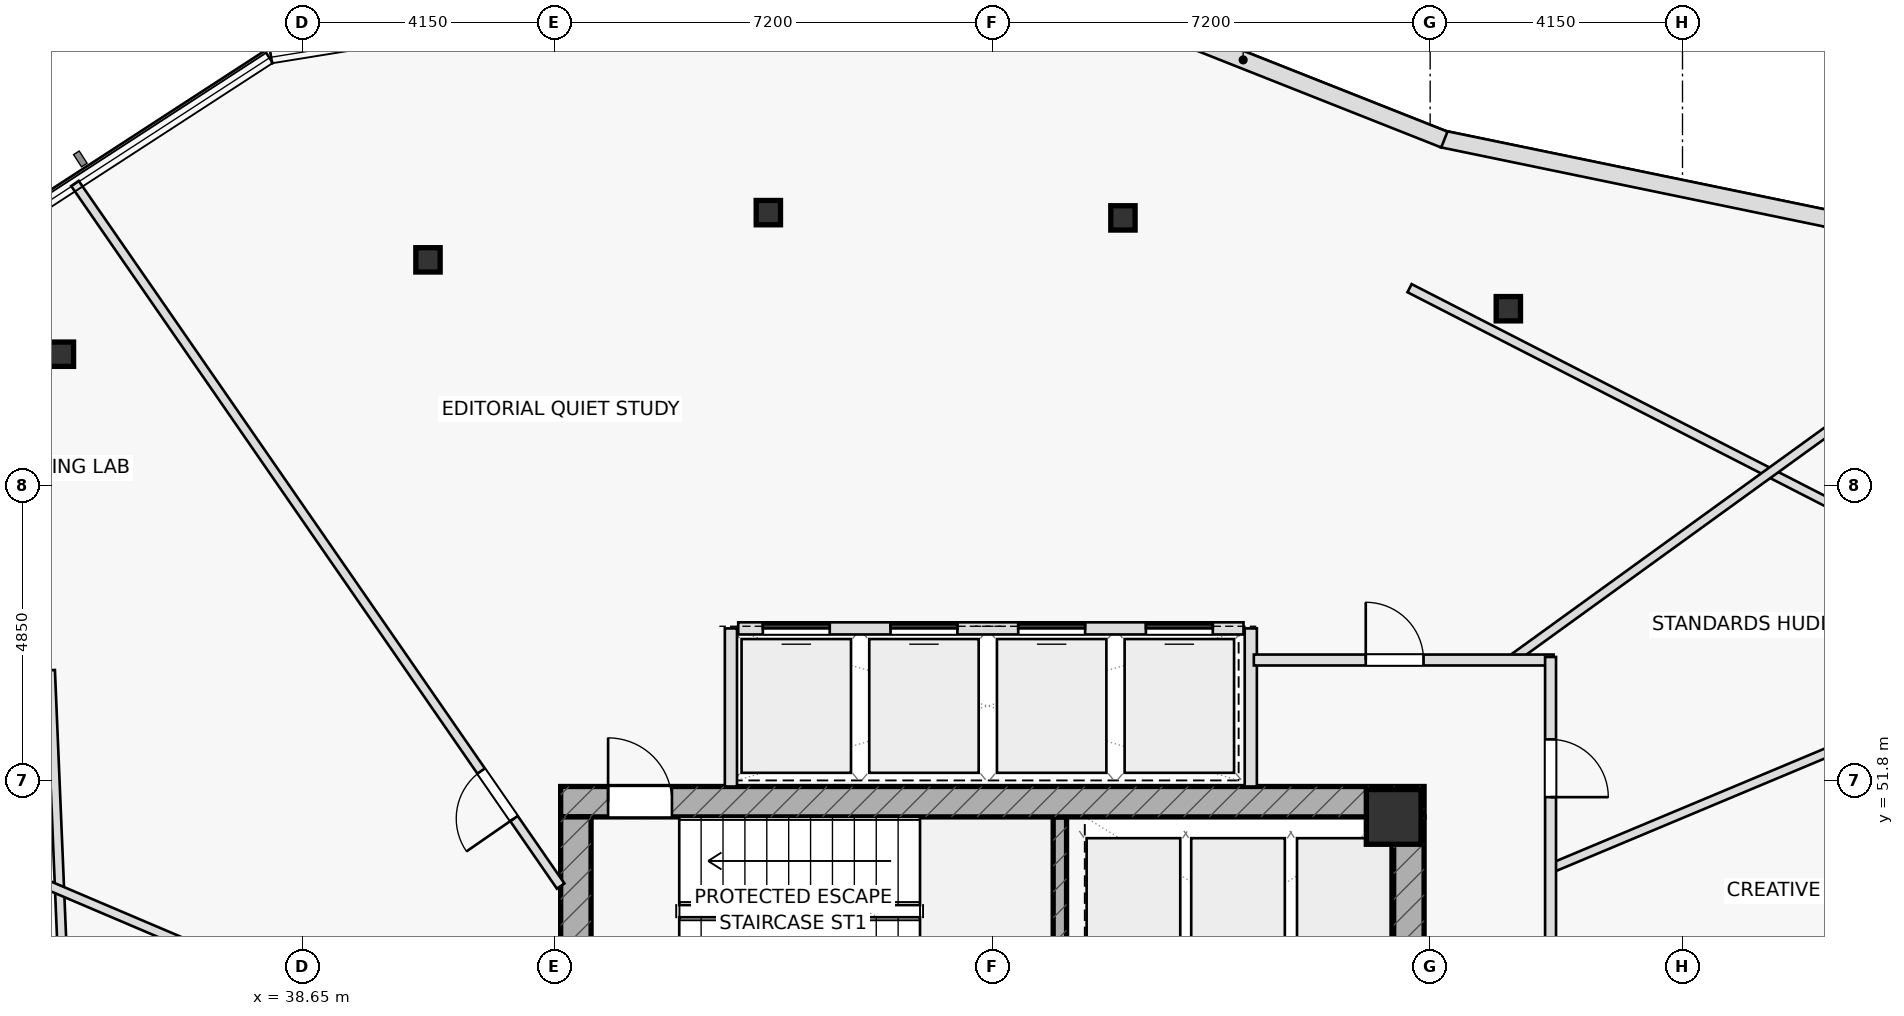
"""IFC4 building model, lengths in metres.
Left out: names, types, materials, properties, quantities, classifications, styles, units other than length and angle.
Written with IfcOpenShell. Run it as: python <this file> out.ifc"""

import sys

from ifc_helpers import new_model, si_unit, direction, frame, frame_2d, origin, origin_2d, place, context, subcontext, project, spatial, rectangle, hollow_rectangle, extrude, element, fill, save


model = new_model("IFC4")
c1 = context("Model", 3, precision=1e-05, world=origin(), true_north=direction((0.0, 1.0)))
c2 = subcontext(c1, "Body", "Model", "MODEL_VIEW")
j1 = project(units=[si_unit("LENGTHUNIT", "METRE"), si_unit("PLANEANGLEUNIT", "RADIAN")], contexts=[c1])
p1 = place(None, origin())
s1 = spatial("IfcSite", under=j1, at=p1, CompositionType="ELEMENT")
p2 = place(p1, origin())
s2 = spatial("IfcBuilding", under=s1, at=p2, CompositionType="ELEMENT")
p3 = place(p2, frame((0.0, 0.0, 321.5)))
s3 = spatial("IfcBuildingStorey", under=s2, at=p3, CompositionType="ELEMENT", Elevation=321.5)
p4 = place(p3, frame((51.11, 48.1, 0.0), z_axis=(0.0, 0.0, 1.0), x_axis=(0.0, 1.0, 0.0)))
e1 = element("IfcWall", 1, at=p4, inside=s3, PredefinedType="SHEAR", context=c2, shape_type="SweptSolid", body=[
    extrude(rectangle(XDim=3.1, YDim=0.22, at=frame_2d((1.55, 0.0))), origin(), (0.0, 0.0, 1.0), 3.55),
])
p5 = place(p3, frame((42.9, 51.45, 0.0), z_axis=(0.0, 0.0, 1.0), x_axis=(1.0, 0.0, 0.0)))
e2 = element("IfcWall", 2, at=p5, inside=s3, PredefinedType="SHEAR", context=c2, shape_type="SweptSolid", body=[
    extrude(rectangle(XDim=14.2, YDim=0.5, at=frame_2d((7.1, 0.0))), origin(), (0.0, 0.0, 1.0), 3.55),
])
p6 = place(p5, frame((0.78, 0.0, 0.0)))
e3 = element("IfcOpeningElement", 3, at=p6, cuts=e2, PredefinedType="OPENING", context=c2, shape_type="SweptSolid", body=[
    extrude(rectangle(XDim=1.05, YDim=2.2, at=frame_2d((0.525, 1.1))), frame((0.0, 0.26, 0.0), z_axis=(0.0, -1.0, 0.0), x_axis=(1.0, 0.0, 0.0)), (0.0, 0.0, 1.0), 0.52),
])
p7 = place(p3, frame((43.15, 38.8, 0.0), z_axis=(0.0, 0.0, 1.0), x_axis=(0.0, 1.0, 0.0)))
e4 = element("IfcWall", 4, at=p7, inside=s3, PredefinedType="SHEAR", context=c2, shape_type="SweptSolid", body=[
    extrude(rectangle(XDim=12.4, YDim=0.5, at=frame_2d((6.2, 0.0))), origin(), (0.0, 0.0, 1.0), 3.55),
])
p8 = place(p3, frame((56.85, 38.8, 0.0), z_axis=(0.0, 0.0, 1.0), x_axis=(0.0, 1.0, 0.0)))
e5 = element("IfcWall", 5, at=p8, inside=s3, PredefinedType="SHEAR", context=c2, shape_type="SweptSolid", body=[
    extrude(rectangle(XDim=12.4, YDim=0.5, at=frame_2d((6.2, 0.0))), origin(), (0.0, 0.0, 1.0), 3.55),
])
p9 = place(p8, frame((3.85, 0.0, 0.0)))
e6 = element("IfcOpeningElement", 6, at=p9, cuts=e5, PredefinedType="OPENING", context=c2, shape_type="SweptSolid", body=[
    extrude(rectangle(XDim=1.5, YDim=2.2, at=frame_2d((0.75, 1.1))), frame((0.0, 0.26, 0.0), z_axis=(0.0, -1.0, 0.0), x_axis=(1.0, 0.0, 0.0)), (0.0, 0.0, 1.0), 0.52),
])
p10 = place(p3, frame((56.6, 51.2, 0.0), z_axis=(0.0, 0.0, 1.0), x_axis=(1.0, 0.0, 0.0)))
e7 = element("IfcColumn", 7, at=p10, inside=s3, PredefinedType="COLUMN", context=c2, shape_type="SweptSolid", body=[
    extrude(rectangle(XDim=0.9, YDim=0.9, at=origin_2d()), origin(), (0.0, 0.0, 1.0), 3.55),
])
for number, where, z_axis, x_axis in (
    (8, (58.486, 59.557, 0.0), (0.0, 0.0, 1.0), (1.0, 0.0, 0.0)),
    (9, (52.147, 61.051, 0.0), (0.0, 0.0, 1.0), (1.0, 0.0, 0.0)),
    (10, (46.315, 61.137, 0.0), (0.0, 0.0, 1.0), (1.0, 0.0, 0.0)),
    (11, (40.718, 60.361, 0.0), (0.0, 0.0, 1.0), (1.0, 0.0, 0.0)),
    (12, (34.689, 58.809, 0.0), (0.0, 0.0, 1.0), (1.0, 0.0, 0.0)),
):
    element("IfcColumn", number, at=place(p3, frame(where, z_axis=z_axis, x_axis=x_axis)), inside=s3, PredefinedType="COLUMN", context=c2, shape_type="SweptSolid", body=[
        extrude(hollow_rectangle(XDim=0.4, YDim=0.4, WallThickness=0.025, at=origin_2d()), origin(), (0.0, 0.0, 1.0), 3.55),
    ])
for number, where, z_axis, x_axis in (
    (13, (45.7, 51.7, 0.0), (0.0, 0.0, 1.0), (0.0, 1.0, 0.0)),
    (14, (54.25, 51.7, 0.0), (0.0, 0.0, 1.0), (0.0, 1.0, 0.0)),
):
    element("IfcWall", number, at=place(p3, frame(where, z_axis=z_axis, x_axis=x_axis)), inside=s3, PredefinedType="PARTITIONING", context=c2, shape_type="SweptSolid", body=[
        extrude(rectangle(XDim=2.6, YDim=0.2, at=frame_2d((1.3, 0.0))), origin(), (0.0, 0.0, 1.0), 3.55),
    ])
p11 = place(p3, frame((34.507, 53.613, 0.0), z_axis=(0.0, 0.0, 1.0), x_axis=(0.041875090182, -0.999122853718, 0.0)))
e15 = element("IfcWall", 15, at=p11, inside=s3, PredefinedType="PARTITIONING", context=c2, shape_type="SweptSolid", body=[
    extrude(rectangle(XDim=8.139, YDim=0.15, at=frame_2d((4.069, 0.0))), origin(), (0.0, 0.0, 1.0), 3.125),
])
p12 = place(p3, frame((66.543, 54.934, 0.0), z_axis=(0.0, 0.0, 1.0), x_axis=(-0.889966951661, 0.456025026673, 0.0)))
e16 = element("IfcWall", 16, at=p12, inside=s3, PredefinedType="PARTITIONING", context=c2, shape_type="SweptSolid", body=[
    extrude(rectangle(XDim=10.879, YDim=0.15, at=frame_2d((5.439, 0.0))), origin(), (0.0, 0.0, 1.0), 3.125),
])
p13 = place(p3, frame((59.18, 50.354, 0.0), z_axis=(0.0, 0.0, 1.0), x_axis=(0.922338705377, 0.38638233987, 0.0)))
e17 = element("IfcWall", 17, at=p13, inside=s3, PredefinedType="PARTITIONING", context=c2, shape_type="SweptSolid", body=[
    extrude(rectangle(XDim=8.267, YDim=0.15, at=frame_2d((4.134, 0.0))), origin(), (0.0, 0.0, 1.0), 3.125),
])
p14 = place(p3, frame((58.532, 53.78, 0.0), z_axis=(0.0, 0.0, 1.0), x_axis=(0.810096856505, 0.58629607118, 0.0)))
e18 = element("IfcWall", 18, at=p14, inside=s3, PredefinedType="PARTITIONING", context=c2, shape_type="SweptSolid", body=[
    extrude(rectangle(XDim=9.768, YDim=0.15, at=frame_2d((4.884, 0.0))), origin(), (0.0, 0.0, 1.0), 3.125),
])
p15 = place(p3, frame((42.9, 50.062, 0.0), z_axis=(0.0, 0.0, 1.0), x_axis=(-0.568663071572, 0.822570550792, 0.0)))
e19 = element("IfcWall", 19, at=p15, inside=s3, PredefinedType="PARTITIONING", context=c2, shape_type="SweptSolid", body=[
    extrude(rectangle(XDim=14.047, YDim=0.15, at=frame_2d((7.023, 0.0))), origin(), (0.0, 0.0, 1.0), 3.075),
])
p16 = place(p15, frame((1.35, 0.0, 0.0)))
e20 = element("IfcOpeningElement", 20, at=p16, cuts=e19, PredefinedType="OPENING", context=c2, shape_type="SweptSolid", body=[
    extrude(rectangle(XDim=0.95, YDim=2.05, at=frame_2d((0.475, 1.025))), frame((0.0, 0.085, 0.0), z_axis=(0.0, -1.0, 0.0), x_axis=(1.0, 0.0, 0.0)), (0.0, 0.0, 1.0), 0.17),
])
p17 = place(p3, frame((39.49, 47.94, 0.0), z_axis=(0.0, 0.0, 1.0), x_axis=(-0.920160749364, 0.391540796507, 0.0)))
e21 = element("IfcWall", 21, at=p17, inside=s3, PredefinedType="PARTITIONING", context=c2, shape_type="SweptSolid", body=[
    extrude(rectangle(XDim=17.142, YDim=0.15, at=frame_2d((8.571, 0.0))), origin(), (0.0, 0.0, 1.0), 3.075),
])
p18 = place(p3, frame((37.08, 47.575, 0.0), z_axis=(0.0, 0.0, 1.0), x_axis=(-0.963875151347, 0.266354449215, 0.0)))
e22 = element("IfcWall", 22, at=p18, inside=s3, PredefinedType="PARTITIONING", context=c2, shape_type="SweptSolid", body=[
    extrude(rectangle(XDim=13.459, YDim=0.15, at=frame_2d((6.73, 0.0))), origin(), (0.0, 0.0, 1.0), 3.075),
])
p19 = place(p3, frame((54.3, 53.78, 0.0), z_axis=(0.0, 0.0, 1.0), x_axis=(1.0, 0.0, 0.0)))
e23 = element("IfcWall", 23, at=p19, inside=s3, PredefinedType="PARTITIONING", context=c2, shape_type="SweptSolid", body=[
    extrude(rectangle(XDim=4.93, YDim=0.18, at=frame_2d((2.465, 0.0))), origin(), (0.0, 0.0, 1.0), 3.55),
])
p20 = place(p19, frame((1.841, 0.0, 0.0)))
e24 = element("IfcOpeningElement", 24, at=p20, cuts=e23, PredefinedType="OPENING", context=c2, shape_type="SweptSolid", body=[
    extrude(rectangle(XDim=0.95, YDim=2.05, at=frame_2d((0.475, 1.025))), frame((0.0, 0.1, 0.0), z_axis=(0.0, -1.0, 0.0), x_axis=(1.0, 0.0, 0.0)), (0.0, 0.0, 1.0), 0.2),
])
p21 = place(p3, frame((59.18, 53.83, 0.0), z_axis=(0.0, 0.0, 1.0), x_axis=(0.0, -1.0, 0.0)))
e25 = element("IfcWall", 25, at=p21, inside=s3, PredefinedType="PARTITIONING", context=c2, shape_type="SweptSolid", body=[
    extrude(rectangle(XDim=5.53, YDim=0.18, at=frame_2d((2.765, 0.0))), origin(), (0.0, 0.0, 1.0), 3.55),
])
p22 = place(p21, frame((1.355, 0.0, 0.0)))
e26 = element("IfcOpeningElement", 26, at=p22, cuts=e25, PredefinedType="OPENING", context=c2, shape_type="SweptSolid", body=[
    extrude(rectangle(XDim=0.95, YDim=2.05, at=frame_2d((0.475, 1.025))), frame((0.0, 0.1, 0.0), z_axis=(0.0, -1.0, 0.0), x_axis=(1.0, 0.0, 0.0)), (0.0, 0.0, 1.0), 0.2),
])
p23 = place(p3, frame((65.307, 60.532, 0.0), z_axis=(0.0, 0.0, 1.0), x_axis=(-0.951871327544, 0.306497921362, 0.0)))
e27 = element("IfcWall", 27, at=p23, inside=s3, PredefinedType="STANDARD", context=c2, shape_type="SweptSolid", body=[
    extrude(rectangle(XDim=1.681, YDim=0.28, at=frame_2d((0.841, 0.0))), origin(), (0.0, 0.0, 1.0), 3.55),
])
p24 = place(p3, frame((63.735, 61.04, 0.0), z_axis=(0.0, 0.0, 1.0), x_axis=(-0.979302516602, 0.202402028095, 0.0)))
e28 = element("IfcWall", 28, at=p24, inside=s3, PredefinedType="STANDARD", context=c2, shape_type="SweptSolid", body=[
    extrude(rectangle(XDim=6.464, YDim=0.28, at=frame_2d((3.232, 0.0))), origin(), (0.0, 0.0, 1.0), 3.55),
])
p25 = place(p3, frame((57.433, 62.339, 0.0), z_axis=(0.0, 0.0, 1.0), x_axis=(-0.929788514936, 0.368094169327, 0.0)))
e29 = element("IfcWall", 29, at=p25, inside=s3, PredefinedType="STANDARD", context=c2, shape_type="SweptSolid", body=[
    extrude(rectangle(XDim=7.117, YDim=0.28, at=frame_2d((3.559, 0.0))), origin(), (0.0, 0.0, 1.0), 3.55),
])
p26 = place(p3, frame((45.82, 54.3, 0.0), z_axis=(0.0, 0.0, 1.0), x_axis=(1.0, 0.0, 0.0)))
e30 = element("IfcWall", 30, at=p26, inside=s3, PredefinedType="PARTITIONING", context=c2, shape_type="SweptSolid", body=[
    extrude(rectangle(XDim=8.31, YDim=0.2, at=frame_2d((4.155, 0.0))), origin(), (0.0, 0.0, 1.0), 3.55),
])
p27 = place(p26, frame((0.405, 0.0, 0.0)))
e31 = element("IfcOpeningElement", 31, at=p27, cuts=e30, PredefinedType="OPENING", context=c2, shape_type="SweptSolid", body=[
    extrude(rectangle(XDim=1.1, YDim=2.15, at=frame_2d((0.55, 1.075))), frame((0.0, 0.11, 0.0), z_axis=(0.0, -1.0, 0.0), x_axis=(1.0, 0.0, 0.0)), (0.0, 0.0, 1.0), 0.22),
])
p28 = place(p26, frame((2.505, 0.0, 0.0)))
e32 = element("IfcOpeningElement", 32, at=p28, cuts=e30, PredefinedType="OPENING", context=c2, shape_type="SweptSolid", body=[
    extrude(rectangle(XDim=1.1, YDim=2.15, at=frame_2d((0.55, 1.075))), frame((0.0, 0.11, 0.0), z_axis=(0.0, -1.0, 0.0), x_axis=(1.0, 0.0, 0.0)), (0.0, 0.0, 1.0), 0.22),
])
p29 = place(p26, frame((4.605, 0.0, 0.0)))
e33 = element("IfcOpeningElement", 33, at=p29, cuts=e30, PredefinedType="OPENING", context=c2, shape_type="SweptSolid", body=[
    extrude(rectangle(XDim=1.1, YDim=2.15, at=frame_2d((0.55, 1.075))), frame((0.0, 0.11, 0.0), z_axis=(0.0, -1.0, 0.0), x_axis=(1.0, 0.0, 0.0)), (0.0, 0.0, 1.0), 0.22),
])
p30 = place(p26, frame((6.705, 0.0, 0.0)))
e34 = element("IfcOpeningElement", 34, at=p30, cuts=e30, PredefinedType="OPENING", context=c2, shape_type="SweptSolid", body=[
    extrude(rectangle(XDim=1.1, YDim=2.15, at=frame_2d((0.55, 1.075))), frame((0.0, 0.11, 0.0), z_axis=(0.0, -1.0, 0.0), x_axis=(1.0, 0.0, 0.0)), (0.0, 0.0, 1.0), 0.22),
])
p31 = place(p6, origin())
e35 = element("IfcDoor", 35, at=p31, inside=s3, OperationType="SINGLE_SWING_LEFT", PredefinedType="DOOR", context=c2, shape_type="SweptSolid", body=[
    extrude(rectangle(XDim=1.05, YDim=2.2, at=frame_2d((0.525, 1.1))), frame((0.0, 0.025, 0.0), z_axis=(0.0, -1.0, 0.0), x_axis=(1.0, 0.0, 0.0)), (0.0, 0.0, 1.0), 0.05),
])
fill(e3, e35)
p32 = place(p16, origin())
e36 = element("IfcDoor", 36, at=p32, inside=s3, OperationType="SINGLE_SWING_LEFT", PredefinedType="DOOR", context=c2, shape_type="SweptSolid", body=[
    extrude(rectangle(XDim=0.95, YDim=2.05, at=frame_2d((0.475, 1.025))), frame((0.0, 0.025, 0.0), z_axis=(0.0, -1.0, 0.0), x_axis=(1.0, 0.0, 0.0)), (0.0, 0.0, 1.0), 0.05),
])
fill(e20, e36)
p33 = place(p20, origin())
e37 = element("IfcDoor", 37, at=p33, inside=s3, OperationType="SINGLE_SWING_LEFT", PredefinedType="DOOR", context=c2, shape_type="SweptSolid", body=[
    extrude(rectangle(XDim=0.95, YDim=2.05, at=frame_2d((0.475, 1.025))), frame((0.0, 0.025, 0.0), z_axis=(0.0, -1.0, 0.0), x_axis=(1.0, 0.0, 0.0)), (0.0, 0.0, 1.0), 0.05),
])
fill(e24, e37)
p34 = place(p22, origin())
e38 = element("IfcDoor", 38, at=p34, inside=s3, OperationType="SINGLE_SWING_RIGHT", PredefinedType="DOOR", context=c2, shape_type="SweptSolid", body=[
    extrude(rectangle(XDim=0.95, YDim=2.05, at=frame_2d((0.475, 1.025))), frame((0.0, 0.025, 0.0), z_axis=(0.0, -1.0, 0.0), x_axis=(1.0, 0.0, 0.0)), (0.0, 0.0, 1.0), 0.05),
])
fill(e26, e38)
p35 = place(p27, origin())
e39 = element("IfcDoor", 39, at=p35, inside=s3, OperationType="SLIDING_TO_LEFT", PredefinedType="DOOR", context=c2, shape_type="SweptSolid", body=[
    extrude(rectangle(XDim=1.1, YDim=2.15, at=frame_2d((0.55, 1.075))), frame((0.0, 0.025, 0.0), z_axis=(0.0, -1.0, 0.0), x_axis=(1.0, 0.0, 0.0)), (0.0, 0.0, 1.0), 0.05),
])
fill(e31, e39)
p36 = place(p28, origin())
e40 = element("IfcDoor", 40, at=p36, inside=s3, OperationType="SLIDING_TO_RIGHT", PredefinedType="DOOR", context=c2, shape_type="SweptSolid", body=[
    extrude(rectangle(XDim=1.1, YDim=2.15, at=frame_2d((0.55, 1.075))), frame((0.0, 0.025, 0.0), z_axis=(0.0, -1.0, 0.0), x_axis=(1.0, 0.0, 0.0)), (0.0, 0.0, 1.0), 0.05),
])
fill(e32, e40)
p37 = place(p29, origin())
e41 = element("IfcDoor", 41, at=p37, inside=s3, OperationType="SLIDING_TO_LEFT", PredefinedType="DOOR", context=c2, shape_type="SweptSolid", body=[
    extrude(rectangle(XDim=1.1, YDim=2.15, at=frame_2d((0.55, 1.075))), frame((0.0, 0.025, 0.0), z_axis=(0.0, -1.0, 0.0), x_axis=(1.0, 0.0, 0.0)), (0.0, 0.0, 1.0), 0.05),
])
fill(e33, e41)
p38 = place(p30, origin())
e42 = element("IfcDoor", 42, at=p38, inside=s3, OperationType="SLIDING_TO_RIGHT", PredefinedType="DOOR", context=c2, shape_type="SweptSolid", body=[
    extrude(rectangle(XDim=1.1, YDim=2.15, at=frame_2d((0.55, 1.075))), frame((0.0, 0.025, 0.0), z_axis=(0.0, -1.0, 0.0), x_axis=(1.0, 0.0, 0.0)), (0.0, 0.0, 1.0), 0.05),
])
fill(e34, e42)
save(model, sys.argv[1])
